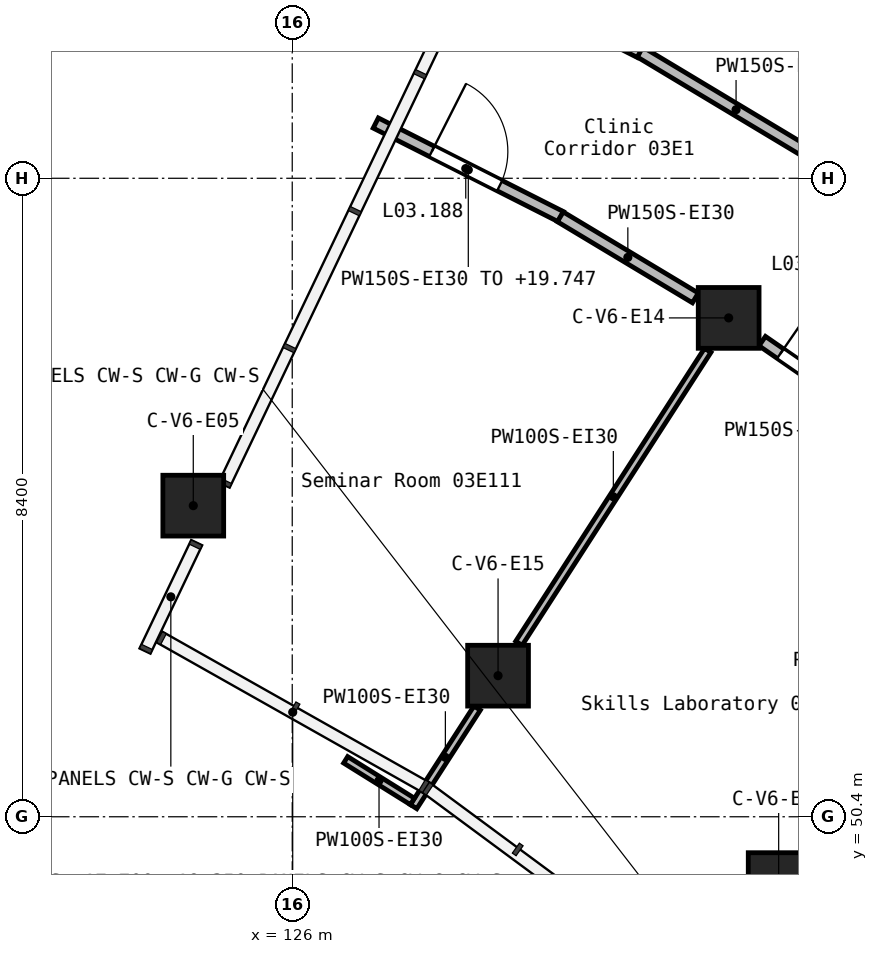
"""IFC4 building model, lengths in metres.
Left out: names, types, materials, properties, quantities, classifications, styles, units other than length and angle.
Written with IfcOpenShell. Run it as: python <this file> out.ifc"""

import sys

from ifc_helpers import new_model, si_unit, direction, frame, frame_2d, origin, origin_2d, place, context, subcontext, project, spatial, rectangle, extrude, element, fill, save


model = new_model("IFC4")
c1 = context("Model", 3, precision=1e-05, world=origin(), true_north=direction((0.0, 1.0)))
c2 = subcontext(c1, "Body", "Model", "MODEL_VIEW")
j1 = project(units=[si_unit("LENGTHUNIT", "METRE"), si_unit("PLANEANGLEUNIT", "RADIAN")], contexts=[c1])
p1 = place(None, origin())
s1 = spatial("IfcSite", under=j1, at=p1, CompositionType="ELEMENT")
p2 = place(p1, origin())
s2 = spatial("IfcBuilding", under=s1, at=p2, CompositionType="ELEMENT")
p3 = place(p2, frame((0.0, 0.0, 16.8)))
s3 = spatial("IfcBuildingStorey", under=s2, at=p3, CompositionType="ELEMENT", Elevation=16.8)
for number, where, z_axis, x_axis in (
    (1, (124.698, 54.493, 0.0), (0.0, 0.0, 1.0), (1.0, 0.0, 0.0)),
    (2, (128.708, 52.256, 0.0), (0.0, 0.0, 1.0), (1.0, 0.0, 0.0)),
    (3, (131.742, 56.963, 0.0), (0.0, 0.0, 1.0), (1.0, 0.0, 0.0)),
    (4, (132.4, 49.527, 0.0), (0.0, 0.0, 1.0), (1.0, 0.0, 0.0)),
):
    element("IfcColumn", number, at=place(p3, frame(where, z_axis=z_axis, x_axis=x_axis)), inside=s3, PredefinedType="COLUMN", context=c2, shape_type="SweptSolid", body=[
        extrude(rectangle(XDim=0.8, YDim=0.8, at=origin_2d()), origin(), (0.0, 0.0, 1.0), 4.2),
    ])
p4 = place(p3, frame((130.572, 60.464, 0.0), z_axis=(0.0, 0.0, 1.0), x_axis=(0.857369075188, -0.514702116676, 0.0)))
e5 = element("IfcWall", 5, at=p4, inside=s3, PredefinedType="PARTITIONING", context=c2, shape_type="SweptSolid", body=[
    extrude(rectangle(XDim=2.958, YDim=0.15, at=frame_2d((1.479, 0.0))), origin(), (0.0, 0.0, 1.0), 3.9),
])
p5 = place(p3, frame((128.132, 61.692, 0.0), z_axis=(0.0, 0.0, 1.0), x_axis=(0.892275475515, -0.45149139061, 0.0)))
e6 = element("IfcWall", 6, at=p5, inside=s3, PredefinedType="PARTITIONING", context=c2, shape_type="SweptSolid", body=[
    extrude(rectangle(XDim=2.736, YDim=0.15, at=frame_2d((1.368, 0.0))), origin(), (0.0, 0.0, 1.0), 2.947),
])
p6 = place(p3, frame((132.184, 56.658, 0.0), z_axis=(0.0, 0.0, 1.0), x_axis=(0.82273696549, -0.568422277551, 0.0)))
e7 = element("IfcWall", 7, at=p6, inside=s3, PredefinedType="PARTITIONING", context=c2, shape_type="SweptSolid", body=[
    extrude(rectangle(XDim=2.193, YDim=0.15, at=frame_2d((1.096, 0.0))), origin(), (0.0, 0.0, 1.0), 3.9),
])
p7 = place(p6, frame((0.29, 0.0, 0.0)))
e8 = element("IfcOpeningElement", 8, at=p7, cuts=e7, PredefinedType="OPENING", context=c2, shape_type="SweptSolid", body=[
    extrude(rectangle(XDim=1.0, YDim=2.1, at=frame_2d((0.5, 1.05))), frame((0.0, 0.085, 0.0), z_axis=(0.0, -1.0, 0.0), x_axis=(1.0, 0.0, 0.0)), (0.0, 0.0, 1.0), 0.17),
])
p8 = place(p3, frame((127.099, 59.527, 0.0), z_axis=(0.0, 0.0, 1.0), x_axis=(0.892287657908, -0.451467313928, 0.0)))
e9 = element("IfcWall", 9, at=p8, inside=s3, PredefinedType="PARTITIONING", context=c2, shape_type="SweptSolid", body=[
    extrude(rectangle(XDim=2.729, YDim=0.15, at=frame_2d((1.364, 0.0))), origin(), (0.0, 0.0, 1.0), 2.947),
])
p9 = place(p8, frame((0.827, 0.0, 0.0)))
e10 = element("IfcOpeningElement", 10, at=p9, cuts=e9, PredefinedType="OPENING", context=c2, shape_type="SweptSolid", body=[
    extrude(rectangle(XDim=1.0, YDim=2.1, at=frame_2d((0.5, 1.05))), frame((0.0, 0.085, 0.0), z_axis=(0.0, -1.0, 0.0), x_axis=(1.0, 0.0, 0.0)), (0.0, 0.0, 1.0), 0.17),
])
p10 = place(p3, frame((129.527, 58.293, 0.0), z_axis=(0.0, 0.0, 1.0), x_axis=(0.8573370195, -0.514755509922, 0.0)))
e11 = element("IfcWall", 11, at=p10, inside=s3, PredefinedType="PARTITIONING", context=c2, shape_type="SweptSolid", body=[
    extrude(rectangle(XDim=2.073, YDim=0.15, at=frame_2d((1.037, 0.0))), origin(), (0.0, 0.0, 1.0), 3.9),
])
p11 = place(p3, frame((127.597, 50.533, 0.0), z_axis=(0.0, 0.0, 1.0), x_axis=(0.541741092646, 0.840545411348, 0.0)))
e12 = element("IfcWall", 12, at=p11, inside=s3, PredefinedType="PARTITIONING", context=c2, shape_type="SweptSolid", body=[
    extrude(rectangle(XDim=1.543, YDim=0.1, at=frame_2d((0.771, 0.0))), origin(), (0.0, 0.0, 1.0), 3.9),
])
p12 = place(p3, frame((128.983, 52.683, 0.0), z_axis=(0.0, 0.0, 1.0), x_axis=(0.541806664818, 0.840503145716, 0.0)))
e13 = element("IfcWall", 13, at=p12, inside=s3, PredefinedType="PARTITIONING", context=c2, shape_type="SweptSolid", body=[
    extrude(rectangle(XDim=4.585, YDim=0.1, at=frame_2d((2.293, 0.0))), origin(), (0.0, 0.0, 1.0), 3.9),
])
p13 = place(p3, frame((126.703, 51.149, 0.0), z_axis=(0.0, 0.0, 1.0), x_axis=(0.848687049906, -0.528895350067, 0.0)))
e14 = element("IfcWall", 14, at=p13, inside=s3, PredefinedType="PARTITIONING", context=c2, shape_type="SweptSolid", body=[
    extrude(rectangle(XDim=1.034, YDim=0.1, at=frame_2d((0.517, 0.0))), origin(), (0.0, 0.0, 1.0), 3.9),
])
p14 = place(p9, frame((1.0, 0.0, 0.0), z_axis=(0.0, 0.0, 1.0), x_axis=(-1.0, 0.0, 0.0)))
e15 = element("IfcDoor", 15, at=p14, inside=s3, OperationType="SINGLE_SWING_RIGHT", PredefinedType="DOOR", context=c2, shape_type="SweptSolid", body=[
    extrude(rectangle(XDim=1.0, YDim=2.1, at=frame_2d((0.5, 1.05))), frame((0.0, 0.025, 0.0), z_axis=(0.0, -1.0, 0.0), x_axis=(1.0, 0.0, 0.0)), (0.0, 0.0, 1.0), 0.05),
])
fill(e10, e15)
p15 = place(p7, frame((1.0, 0.0, 0.0), z_axis=(0.0, 0.0, 1.0), x_axis=(-1.0, 0.0, 0.0)))
e16 = element("IfcDoor", 16, at=p15, inside=s3, OperationType="SINGLE_SWING_RIGHT", PredefinedType="DOOR", context=c2, shape_type="SweptSolid", body=[
    extrude(rectangle(XDim=1.0, YDim=2.1, at=frame_2d((0.5, 1.05))), frame((0.0, 0.025, 0.0), z_axis=(0.0, -1.0, 0.0), x_axis=(1.0, 0.0, 0.0)), (0.0, 0.0, 1.0), 0.05),
])
fill(e8, e16)
save(model, sys.argv[1])
